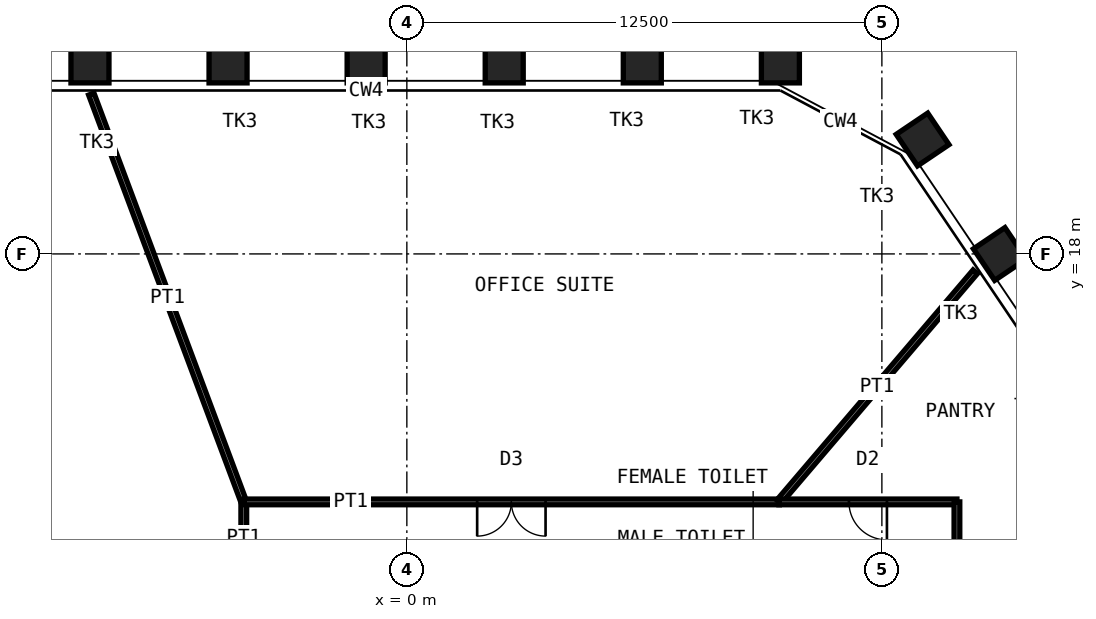
"""IFC4 building model, lengths in metres.
Left out: names, types, materials, properties, quantities, classifications, styles, units other than length and angle.
Written with IfcOpenShell. Run it as: python <this file> out.ifc"""

import sys

from ifc_helpers import new_model, si_unit, direction, frame, frame_2d, origin, origin_2d, place, context, subcontext, project, spatial, rectangle, hollow_rectangle, extrude, element, fill, save


model = new_model("IFC4")
c1 = context("Model", 3, precision=1e-05, world=origin(), true_north=direction((0.0, 1.0)))
c2 = subcontext(c1, "Body", "Model", "MODEL_VIEW")
j1 = project(units=[si_unit("LENGTHUNIT", "METRE"), si_unit("PLANEANGLEUNIT", "RADIAN")], contexts=[c1])
p1 = place(None, origin())
s1 = spatial("IfcSite", under=j1, at=p1, CompositionType="ELEMENT")
p2 = place(p1, origin())
s2 = spatial("IfcBuilding", under=s1, at=p2, CompositionType="ELEMENT")
p3 = place(p2, frame((0.0, 0.0, 251.8)))
s3 = spatial("IfcBuildingStorey", under=s2, at=p3, CompositionType="ELEMENT", Elevation=251.8)
for number, where, z_axis, x_axis in (
    (1, (-8.338, 23.0, 0.0), (0.0, 0.0, 1.0), (-1.0, 0.0, 0.0)),
    (2, (-4.705, 23.0, 0.0), (0.0, 0.0, 1.0), (-1.0, 0.0, 0.0)),
    (3, (-1.071, 23.0, 0.0), (0.0, 0.0, 1.0), (-1.0, 0.0, 0.0)),
    (4, (2.562, 23.0, 0.0), (0.0, 0.0, 1.0), (-1.0, 0.0, 0.0)),
    (5, (6.196, 23.0, 0.0), (0.0, 0.0, 1.0), (-1.0, 0.0, 0.0)),
    (6, (9.829, 23.0, 0.0), (0.0, 0.0, 1.0), (-1.0, 0.0, 0.0)),
    (7, (13.571, 21.01, 0.0), (0.0, 0.0, 1.0), (-0.559, 0.829, 0.0)),
    (8, (15.603, 17.998, 0.0), (0.0, 0.0, 1.0), (-0.559, 0.829, 0.0)),
):
    element("IfcColumn", number, at=place(p3, frame(where, z_axis=z_axis, x_axis=x_axis)), inside=s3, PredefinedType="COLUMN", context=c2, shape_type="SweptSolid", body=[
        extrude(hollow_rectangle(XDim=1.0, YDim=1.0, WallThickness=0.08, at=origin_2d()), origin(), (0.0, 0.0, 1.0), 4.2),
    ])
p4 = place(p3, frame((-4.291, 9.6, 0.0), z_axis=(0.0, 0.0, 1.0), x_axis=(0.0, 1.0, 0.0)))
e9 = element("IfcWall", 9, at=p4, inside=s3, PredefinedType="PARTITIONING", context=c2, shape_type="SweptSolid", body=[
    extrude(rectangle(XDim=1.875, YDim=0.15, at=frame_2d((0.938, 0.0))), origin(), (0.0, 0.0, 1.0), 3.92),
])
p5 = place(p3, frame((-8.303, 22.206, 0.0), z_axis=(0.0, 0.0, 1.0), x_axis=(0.350242883069, -0.936658914899, 0.0)))
e10 = element("IfcWall", 10, at=p5, inside=s3, PredefinedType="PARTITIONING", context=c2, shape_type="SweptSolid", body=[
    extrude(rectangle(XDim=11.457, YDim=0.15, at=frame_2d((5.729, 0.0))), origin(), (0.0, 0.0, 1.0), 2.72),
])
p6 = place(p3, frame((-4.291, 11.475, 0.0), z_axis=(0.0, 0.0, 1.0), x_axis=(1.0, 0.0, 0.0)))
e11 = element("IfcWall", 11, at=p6, inside=s3, PredefinedType="PARTITIONING", context=c2, shape_type="SweptSolid", body=[
    extrude(rectangle(XDim=14.082, YDim=0.15, at=frame_2d((7.041, 0.0))), origin(), (0.0, 0.0, 1.0), 3.92),
])
p7 = place(p6, frame((6.141, 0.0, 0.0)))
e12 = element("IfcOpeningElement", 12, at=p7, cuts=e11, PredefinedType="OPENING", context=c2, shape_type="SweptSolid", body=[
    extrude(rectangle(XDim=1.8, YDim=2.4, at=frame_2d((0.9, 1.2))), frame((0.0, 0.085, 0.0), z_axis=(0.0, -1.0, 0.0), x_axis=(1.0, 0.0, 0.0)), (0.0, 0.0, 1.0), 0.17),
])
p8 = place(p3, frame((14.958, 17.531, 0.0), z_axis=(0.0, 0.0, 1.0), x_axis=(-0.649097500837, -0.760705221756, 0.0)))
e13 = element("IfcWall", 13, at=p8, inside=s3, PredefinedType="PARTITIONING", context=c2, shape_type="SweptSolid", body=[
    extrude(rectangle(XDim=7.96, YDim=0.15, at=frame_2d((3.98, 0.0))), origin(), (0.0, 0.0, 1.0), 2.72),
])
p9 = place(p3, frame((9.791, 11.475, 0.0), z_axis=(0.0, 0.0, 1.0), x_axis=(1.0, 0.0, 0.0)))
e14 = element("IfcWall", 14, at=p9, inside=s3, PredefinedType="PARTITIONING", context=c2, shape_type="SweptSolid", body=[
    extrude(rectangle(XDim=4.684, YDim=0.15, at=frame_2d((2.342, 0.0))), origin(), (0.0, 0.0, 1.0), 3.92),
])
p10 = place(p9, frame((1.842, 0.0, 0.0)))
e15 = element("IfcOpeningElement", 15, at=p10, cuts=e14, PredefinedType="OPENING", context=c2, shape_type="SweptSolid", body=[
    extrude(rectangle(XDim=1.0, YDim=2.4, at=frame_2d((0.5, 1.2))), frame((0.0, 0.085, 0.0), z_axis=(0.0, -1.0, 0.0), x_axis=(1.0, 0.0, 0.0)), (0.0, 0.0, 1.0), 0.17),
])
p11 = place(p3, frame((14.475, 11.475, 0.0), z_axis=(0.0, 0.0, 1.0), x_axis=(0.0, -1.0, 0.0)))
e16 = element("IfcWall", 16, at=p11, inside=s3, PredefinedType="PARTITIONING", context=c2, shape_type="SweptSolid", body=[
    extrude(rectangle(XDim=2.692, YDim=0.15, at=frame_2d((1.346, 0.0))), origin(), (0.0, 0.0, 1.0), 3.92),
])
p12 = place(p3, frame((19.001, 11.53, 0.0), z_axis=(0.0, 0.0, 1.0), x_axis=(-0.854906581035, -0.518781975114, 0.0)))
e17 = element("IfcWall", 17, at=p12, inside=s3, PredefinedType="PARTITIONING", context=c2, shape_type="SweptSolid", body=[
    extrude(rectangle(XDim=5.294, YDim=0.15, at=frame_2d((2.647, 0.0))), origin(), (0.0, 0.0, 1.0), 2.72),
])
p13 = place(p7, origin())
e18 = element("IfcDoor", 18, at=p13, inside=s3, OperationType="DOUBLE_DOOR_DOUBLE_SWING", PredefinedType="DOOR", context=c2, shape_type="SweptSolid", body=[
    extrude(rectangle(XDim=1.8, YDim=2.4, at=frame_2d((0.9, 1.2))), frame((0.0, 0.025, 0.0), z_axis=(0.0, -1.0, 0.0), x_axis=(1.0, 0.0, 0.0)), (0.0, 0.0, 1.0), 0.05),
])
fill(e12, e18)
p14 = place(p10, origin())
e19 = element("IfcDoor", 19, at=p14, inside=s3, OperationType="SINGLE_SWING_RIGHT", PredefinedType="DOOR", context=c2, shape_type="SweptSolid", body=[
    extrude(rectangle(XDim=1.0, YDim=2.4, at=frame_2d((0.5, 1.2))), frame((0.0, 0.025, 0.0), z_axis=(0.0, -1.0, 0.0), x_axis=(1.0, 0.0, 0.0)), (0.0, 0.0, 1.0), 0.05),
])
fill(e15, e19)
save(model, sys.argv[1])
